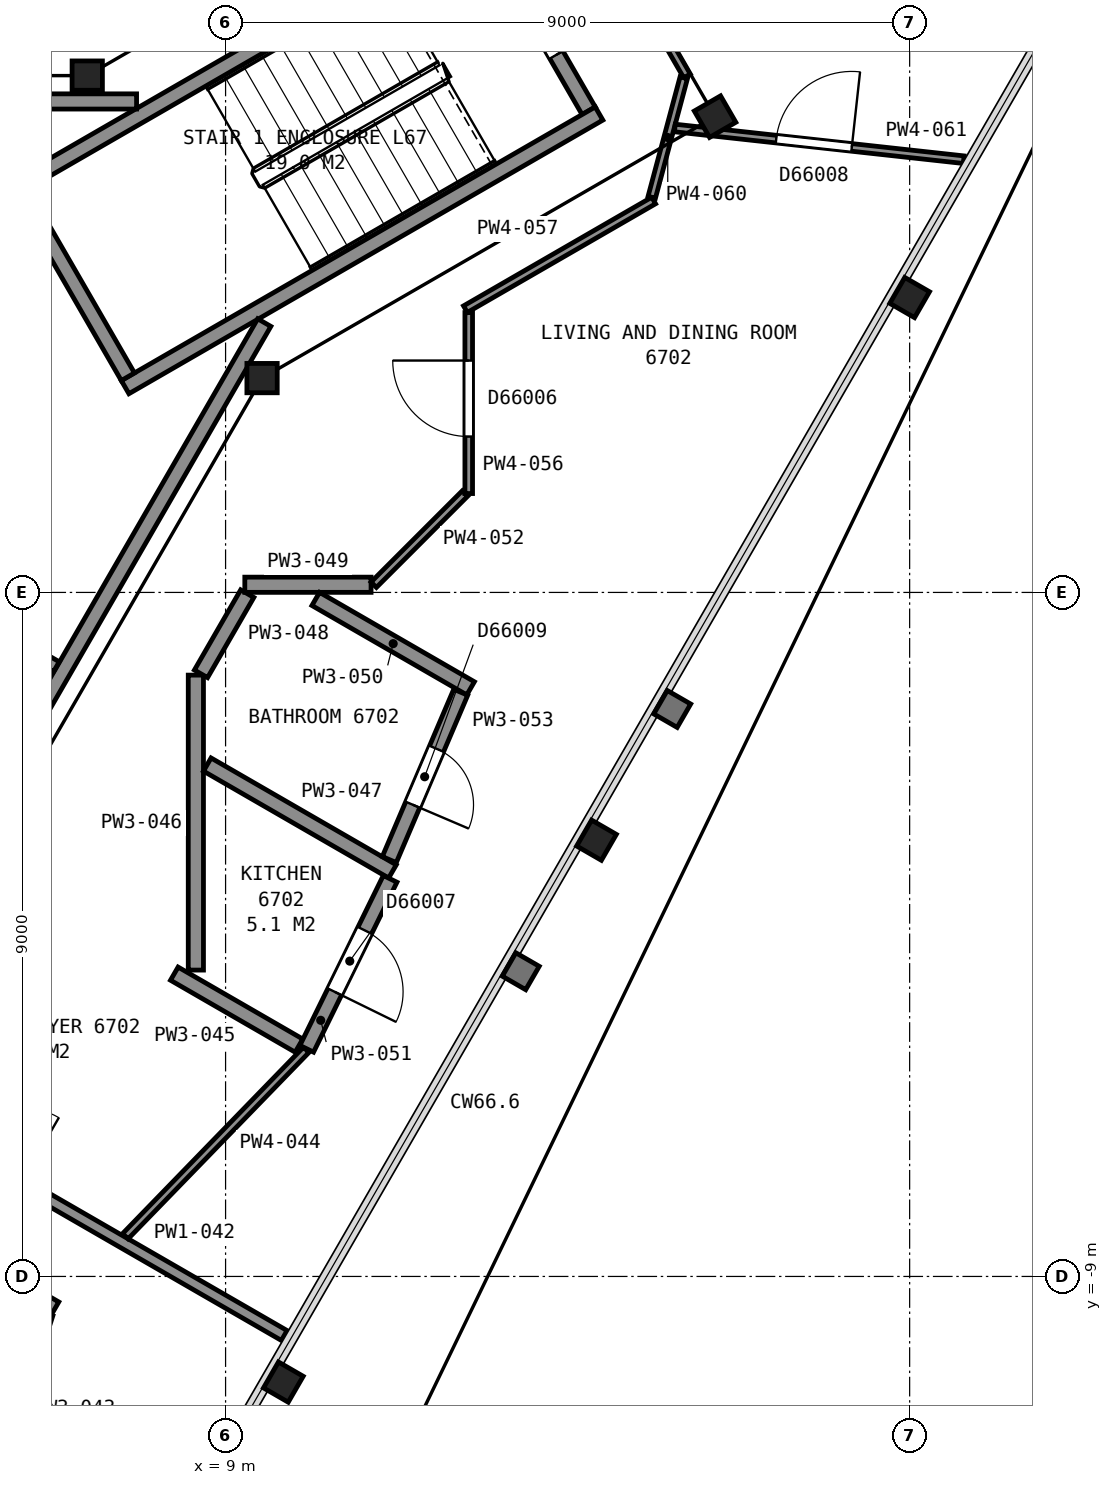
"""IFC4 building model, lengths in metres.
Left out: names, types, materials, properties, quantities, classifications, styles, units other than length and angle.
Written with IfcOpenShell. Run it as: python <this file> out.ifc"""

import sys

from ifc_helpers import new_model, si_unit, direction, frame, frame_2d, origin, origin_2d, place, context, subcontext, project, spatial, rectangle, i_section, extrude, element, fill, save


model = new_model("IFC4")
c1 = context("Model", 3, precision=1e-05, world=origin(), true_north=direction((0.0, 1.0)))
c2 = subcontext(c1, "Body", "Model", "MODEL_VIEW")
j1 = project(units=[si_unit("LENGTHUNIT", "METRE"), si_unit("PLANEANGLEUNIT", "RADIAN")], contexts=[c1])
p1 = place(None, origin())
s1 = spatial("IfcSite", under=j1, at=p1, CompositionType="ELEMENT")
p2 = place(p1, origin())
s2 = spatial("IfcBuilding", under=s1, at=p2, CompositionType="ELEMENT")
p3 = place(p2, frame((0.0, 0.0, 267.7)))
s3 = spatial("IfcBuildingStorey", under=s2, at=p3, CompositionType="ELEMENT", Elevation=267.7)
for number, where, z_axis, x_axis in (
    (1, (9.76, -10.39, 0.0), (0.0, 0.0, 1.0), (-0.5, -0.866, 0.0)),
    (2, (13.88, -3.26, 0.0), (0.0, 0.0, 1.0), (-0.5, -0.866, 0.0)),
    (3, (18.0, 3.88, 0.0), (0.0, 0.0, 1.0), (-0.5, -0.866, 0.0)),
):
    element("IfcColumn", number, at=place(p3, frame(where, z_axis=z_axis, x_axis=x_axis)), inside=s3, PredefinedType="COLUMN", context=c2, shape_type="SweptSolid", body=[
        extrude(i_section(OverallWidth=0.394, OverallDepth=0.376, WebThickness=0.017, FlangeThickness=0.028, FilletRadius=0.015, at=origin_2d()), origin(), (0.0, 0.0, 1.0), 3.7),
    ])
p4 = place(p3, frame((9.48, 2.82, 0.0), z_axis=(0.0, 0.0, 1.0), x_axis=(1.0, 0.0, 0.0)))
e4 = element("IfcColumn", 4, at=p4, inside=s3, PredefinedType="COLUMN", context=c2, shape_type="SweptSolid", body=[
    extrude(i_section(OverallWidth=0.399, OverallDepth=0.386, WebThickness=0.021, FlangeThickness=0.033, FilletRadius=0.015, at=origin_2d()), origin(), (0.0, 0.0, 1.0), 3.7),
])
p5 = place(p3, frame((15.44, 6.26, 0.0), z_axis=(0.0, 0.0, 1.0), x_axis=(0.5, -0.866025403784, 0.0)))
e5 = element("IfcColumn", 5, at=p5, inside=s3, PredefinedType="COLUMN", context=c2, shape_type="SweptSolid", body=[
    extrude(i_section(OverallWidth=0.401, OverallDepth=0.399, WebThickness=0.025, FlangeThickness=0.04, FilletRadius=0.015, at=origin_2d()), origin(), (0.0, 0.0, 1.0), 3.7),
])
p6 = place(p3, frame((7.18, 6.8, 0.0), z_axis=(0.0, 0.0, 1.0), x_axis=(1.0, 0.0, 0.0)))
e6 = element("IfcColumn", 6, at=p6, inside=s3, PredefinedType="COLUMN", context=c2, shape_type="SweptSolid", body=[
    extrude(i_section(OverallWidth=0.399, OverallDepth=0.386, WebThickness=0.021, FlangeThickness=0.033, FilletRadius=0.015, at=origin_2d()), origin(), (0.0, 0.0, 1.0), 3.7),
])
p7 = place(p3, frame((13.777, 6.338, 0.0), z_axis=(0.0, 0.0, 1.0), x_axis=(-0.500049511043, 0.865996816683, 0.0)))
e7 = element("IfcWall", 7, at=p7, inside=s3, PredefinedType="PARTITIONING", context=c2, shape_type="SweptSolid", body=[
    extrude(rectangle(XDim=2.8, YDim=0.2, at=frame_2d((1.4, 0.0))), origin(), (0.0, 0.0, 1.0), 3.45),
])
p8 = place(p7, frame((0.85, 0.0, 0.0)))
e8 = element("IfcOpeningElement", 8, at=p8, cuts=e7, PredefinedType="OPENING", context=c2, shape_type="SweptSolid", body=[
    extrude(rectangle(XDim=1.1, YDim=2.1, at=frame_2d((0.55, 1.05))), frame((0.0, 0.11, 0.0), z_axis=(0.0, -1.0, 0.0), x_axis=(1.0, 0.0, 0.0)), (0.0, 0.0, 1.0), 0.22),
])
for number, where, z_axis, x_axis in (
    (9, (6.178, 5.299, 0.0), (0.0, 0.0, 1.0), (0.866, 0.5, 0.0)),
    (10, (7.678, 2.701, 0.0), (0.0, 0.0, 1.0), (0.866, 0.5, 0.0)),
):
    element("IfcWall", number, at=place(p3, frame(where, z_axis=z_axis, x_axis=x_axis)), inside=s3, PredefinedType="PARTITIONING", context=c2, shape_type="SweptSolid", body=[
        extrude(rectangle(XDim=7.2, YDim=0.2, at=frame_2d((3.6, 0.0))), origin(), (0.0, 0.0, 1.0), 3.45),
    ])
p9 = place(p3, frame((7.715, 2.838, 0.0), z_axis=(0.0, 0.0, 1.0), x_axis=(-0.500049511043, 0.865996816683, 0.0)))
e11 = element("IfcWall", 11, at=p9, inside=s3, PredefinedType="PARTITIONING", context=c2, shape_type="SweptSolid", body=[
    extrude(rectangle(XDim=2.8, YDim=0.2, at=frame_2d((1.4, 0.0))), origin(), (0.0, 0.0, 1.0), 3.45),
])
p10 = place(p3, frame((7.829, 6.46, 0.0), z_axis=(0.0, 0.0, 1.0), x_axis=(-1.0, 0.0, 0.0)))
e12 = element("IfcWall", 12, at=p10, inside=s3, PredefinedType="PARTITIONING", context=c2, shape_type="SweptSolid", body=[
    extrude(rectangle(XDim=15.658, YDim=0.2, at=frame_2d((7.829, 0.0))), origin(), (0.0, 0.0, 1.0), 3.45),
])
p11 = place(p10, frame((12.168, 0.0, 0.0)))
e13 = element("IfcOpeningElement", 13, at=p11, cuts=e12, PredefinedType="OPENING", context=c2, shape_type="SweptSolid", body=[
    extrude(rectangle(XDim=1.2, YDim=2.1, at=frame_2d((0.6, 1.05))), frame((0.0, 0.11, 0.0), z_axis=(0.0, -1.0, 0.0), x_axis=(1.0, 0.0, 0.0)), (0.0, 0.0, 1.0), 0.22),
])
p12 = place(p3, frame((3.828, -6.29, 0.0), z_axis=(0.0, 0.0, 1.0), x_axis=(0.499979739078, 0.866037101117, 0.0)))
e14 = element("IfcWall", 14, at=p12, inside=s3, PredefinedType="PARTITIONING", context=c2, shape_type="SweptSolid", body=[
    extrude(rectangle(XDim=11.363, YDim=0.2, at=frame_2d((5.681, 0.0))), origin(), (0.0, 0.0, 1.0), 3.45),
])
p13 = place(p12, frame((0.55, 0.0, 0.0)))
e15 = element("IfcOpeningElement", 15, at=p13, cuts=e14, PredefinedType="OPENING", context=c2, shape_type="SweptSolid", body=[
    extrude(rectangle(XDim=1.2, YDim=2.1, at=frame_2d((0.6, 1.05))), frame((0.0, 0.11, 0.0), z_axis=(0.0, -1.0, 0.0), x_axis=(1.0, 0.0, 0.0)), (0.0, 0.0, 1.0), 0.22),
])
p14 = place(p3, frame((6.774, -0.978, 0.0), z_axis=(0.0, 0.0, 1.0), x_axis=(-0.866062920605, 0.499935013329, 0.0)))
e16 = element("IfcWall", 16, at=p14, inside=s3, PredefinedType="PARTITIONING", context=c2, shape_type="SweptSolid", body=[
    extrude(rectangle(XDim=2.22, YDim=0.15, at=frame_2d((1.11, 0.0))), origin(), (0.0, 0.0, 1.0), 3.45),
])
p15 = place(p14, frame((0.646, 0.0, 0.0)))
e17 = element("IfcOpeningElement", 17, at=p15, cuts=e16, PredefinedType="OPENING", context=c2, shape_type="SweptSolid", body=[
    extrude(rectangle(XDim=0.9, YDim=2.1, at=frame_2d((0.45, 1.05))), frame((0.0, 0.085, 0.0), z_axis=(0.0, -1.0, 0.0), x_axis=(1.0, 0.0, 0.0)), (0.0, 0.0, 1.0), 0.17),
])
p16 = place(p3, frame((3.498, -7.541, 0.0), z_axis=(0.0, 0.0, 1.0), x_axis=(0.865985624761, -0.500068892961, 0.0)))
e18 = element("IfcWall", 18, at=p16, inside=s3, PredefinedType="PARTITIONING", context=c2, shape_type="SweptSolid", body=[
    extrude(rectangle(XDim=3.762, YDim=0.2, at=frame_2d((1.881, 0.0))), origin(), (0.0, 0.0, 1.0), 2.723),
])
p17 = place(p3, frame((9.772, -9.777, 0.0), z_axis=(0.0, 0.0, 1.0), x_axis=(-0.866083818164, 0.499898809675, 0.0)))
e19 = element("IfcWall", 19, at=p17, inside=s3, PredefinedType="PARTITIONING", context=c2, shape_type="SweptSolid", body=[
    extrude(rectangle(XDim=6.551, YDim=0.15, at=frame_2d((3.275, 0.0))), origin(), (0.0, 0.0, 1.0), 2.723),
])
p18 = place(p17, frame((4.001, 0.0, 0.0)))
e20 = element("IfcOpeningElement", 20, at=p18, cuts=e19, PredefinedType="OPENING", context=c2, shape_type="SweptSolid", body=[
    extrude(rectangle(XDim=1.0, YDim=2.1, at=frame_2d((0.5, 1.05))), frame((0.0, 0.085, 0.0), z_axis=(0.0, -1.0, 0.0), x_axis=(1.0, 0.0, 0.0)), (0.0, 0.0, 1.0), 0.17),
])
p19 = place(p3, frame((5.824, -11.999, 0.0), z_axis=(0.0, 0.0, 1.0), x_axis=(0.306054089199, 0.95201412515, 0.0)))
e21 = element("IfcWall", 21, at=p19, inside=s3, PredefinedType="PARTITIONING", context=c2, shape_type="SweptSolid", body=[
    extrude(rectangle(XDim=2.64, YDim=0.2, at=frame_2d((1.32, 0.0))), origin(), (0.0, 0.0, 1.0), 2.723),
])
p20 = place(p3, frame((7.682, -8.47, 0.0), z_axis=(0.0, 0.0, 1.0), x_axis=(0.696344433623, 0.717707760696, 0.0)))
e22 = element("IfcWall", 22, at=p20, inside=s3, PredefinedType="PARTITIONING", context=c2, shape_type="SweptSolid", body=[
    extrude(rectangle(XDim=3.417, YDim=0.1, at=frame_2d((1.708, 0.0))), origin(), (0.0, 0.0, 1.0), 2.723),
])
p21 = place(p3, frame((8.325, -5.016, 0.0), z_axis=(0.0, 0.0, 1.0), x_axis=(0.866093293964, -0.499882392319, 0.0)))
e23 = element("IfcWall", 23, at=p21, inside=s3, PredefinedType="PARTITIONING", context=c2, shape_type="SweptSolid", body=[
    extrude(rectangle(XDim=1.894, YDim=0.2, at=frame_2d((0.947, 0.0))), origin(), (0.0, 0.0, 1.0), 2.723),
])
p22 = place(p3, frame((8.609, -4.969, 0.0), z_axis=(0.0, 0.0, 1.0), x_axis=(0.0, 1.0, 0.0)))
e24 = element("IfcWall", 24, at=p22, inside=s3, PredefinedType="PARTITIONING", context=c2, shape_type="SweptSolid", body=[
    extrude(rectangle(XDim=3.881, YDim=0.2, at=frame_2d((1.94, 0.0))), origin(), (0.0, 0.0, 1.0), 2.723),
])
p23 = place(p3, frame((8.759, -2.265, 0.0), z_axis=(0.0, 0.0, 1.0), x_axis=(0.866098885879, -0.499872703674, 0.0)))
e25 = element("IfcWall", 25, at=p23, inside=s3, PredefinedType="PARTITIONING", context=c2, shape_type="SweptSolid", body=[
    extrude(rectangle(XDim=2.813, YDim=0.2, at=frame_2d((1.407, 0.0))), origin(), (0.0, 0.0, 1.0), 2.723),
])
p24 = place(p3, frame((8.677, -1.071, 0.0), z_axis=(0.0, 0.0, 1.0), x_axis=(0.499803412959, 0.86613887362, 0.0)))
e26 = element("IfcWall", 26, at=p24, inside=s3, PredefinedType="PARTITIONING", context=c2, shape_type="SweptSolid", body=[
    extrude(rectangle(XDim=1.218, YDim=0.2, at=frame_2d((0.609, 0.0))), origin(), (0.0, 0.0, 1.0), 2.723),
])
p25 = place(p3, frame((9.253, 0.101, 0.0), z_axis=(0.0, 0.0, 1.0), x_axis=(1.0, 0.0, 0.0)))
e27 = element("IfcWall", 27, at=p25, inside=s3, PredefinedType="PARTITIONING", context=c2, shape_type="SweptSolid", body=[
    extrude(rectangle(XDim=1.661, YDim=0.2, at=frame_2d((0.831, 0.0))), origin(), (0.0, 0.0, 1.0), 2.723),
])
p26 = place(p3, frame((10.186, -0.086, 0.0), z_axis=(0.0, 0.0, 1.0), x_axis=(0.866024864377, -0.50000093428, 0.0)))
e28 = element("IfcWall", 28, at=p26, inside=s3, PredefinedType="PARTITIONING", context=c2, shape_type="SweptSolid", body=[
    extrude(rectangle(XDim=2.353, YDim=0.2, at=frame_2d((1.176, 0.0))), origin(), (0.0, 0.0, 1.0), 2.723),
])
p27 = place(p3, frame((10.068, -6.005, 0.0), z_axis=(0.0, 0.0, 1.0), x_axis=(0.440614307878, 0.897696514248, 0.0)))
e29 = element("IfcWall", 29, at=p27, inside=s3, PredefinedType="PARTITIONING", context=c2, shape_type="SweptSolid", body=[
    extrude(rectangle(XDim=2.491, YDim=0.2, at=frame_2d((1.245, 0.0))), origin(), (0.0, 0.0, 1.0), 2.723),
])
p28 = place(p27, frame((0.835, 0.0, 0.0)))
e30 = element("IfcOpeningElement", 30, at=p28, cuts=e29, PredefinedType="OPENING", context=c2, shape_type="SweptSolid", body=[
    extrude(rectangle(XDim=0.9, YDim=2.1, at=frame_2d((0.45, 1.05))), frame((0.0, 0.11, 0.0), z_axis=(0.0, -1.0, 0.0), x_axis=(1.0, 0.0, 0.0)), (0.0, 0.0, 1.0), 0.22),
])
p29 = place(p3, frame((10.949, 0.101, 0.0), z_axis=(0.0, 0.0, 1.0), x_axis=(0.707106781187, 0.707106781187, 0.0)))
e31 = element("IfcWall", 31, at=p29, inside=s3, PredefinedType="PARTITIONING", context=c2, shape_type="SweptSolid", body=[
    extrude(rectangle(XDim=1.698, YDim=0.1, at=frame_2d((0.849, 0.0))), origin(), (0.0, 0.0, 1.0), 2.723),
])
p30 = place(p3, frame((11.154, -3.515, 0.0), z_axis=(0.0, 0.0, 1.0), x_axis=(0.392515754301, 0.919745281383, 0.0)))
e32 = element("IfcWall", 32, at=p30, inside=s3, PredefinedType="PARTITIONING", context=c2, shape_type="SweptSolid", body=[
    extrude(rectangle(XDim=2.394, YDim=0.2, at=frame_2d((1.197, 0.0))), origin(), (0.0, 0.0, 1.0), 2.723),
])
p31 = place(p30, frame((0.785, 0.0, 0.0)))
e33 = element("IfcOpeningElement", 33, at=p31, cuts=e32, PredefinedType="OPENING", context=c2, shape_type="SweptSolid", body=[
    extrude(rectangle(XDim=0.8, YDim=2.1, at=frame_2d((0.4, 1.05))), frame((0.0, 0.11, 0.0), z_axis=(0.0, -1.0, 0.0), x_axis=(1.0, 0.0, 0.0)), (0.0, 0.0, 1.0), 0.22),
])
p32 = place(p3, frame((12.199, 3.682, 0.0), z_axis=(0.0, 0.0, 1.0), x_axis=(0.0, -1.0, 0.0)))
e34 = element("IfcWall", 34, at=p32, inside=s3, PredefinedType="PARTITIONING", context=c2, shape_type="SweptSolid", body=[
    extrude(rectangle(XDim=2.381, YDim=0.1, at=frame_2d((1.19, 0.0))), origin(), (0.0, 0.0, 1.0), 2.723),
])
p33 = place(p32, frame((0.631, 0.0, 0.0)))
e35 = element("IfcOpeningElement", 35, at=p33, cuts=e34, PredefinedType="OPENING", context=c2, shape_type="SweptSolid", body=[
    extrude(rectangle(XDim=1.0, YDim=2.1, at=frame_2d((0.5, 1.05))), frame((0.0, 0.06, 0.0), z_axis=(0.0, -1.0, 0.0), x_axis=(1.0, 0.0, 0.0)), (0.0, 0.0, 1.0), 0.12),
])
p34 = place(p3, frame((12.156, 3.727, 0.0), z_axis=(0.0, 0.0, 1.0), x_axis=(0.866012137121, 0.500022977831, 0.0)))
e36 = element("IfcWall", 36, at=p34, inside=s3, PredefinedType="PARTITIONING", context=c2, shape_type="SweptSolid", body=[
    extrude(rectangle(XDim=2.86, YDim=0.1, at=frame_2d((1.43, 0.0))), origin(), (0.0, 0.0, 1.0), 2.723),
])
p35 = place(p3, frame((13.771, 9.047, 0.0), z_axis=(0.0, 0.0, 1.0), x_axis=(0.500006934395, -0.866021400173, 0.0)))
e37 = element("IfcWall", 37, at=p35, inside=s3, PredefinedType="PARTITIONING", context=c2, shape_type="SweptSolid", body=[
    extrude(rectangle(XDim=2.6, YDim=0.1, at=frame_2d((1.3, 0.0))), origin(), (0.0, 0.0, 1.0), 2.723),
])
p36 = place(p3, frame((14.607, 5.2, 0.0), z_axis=(0.0, 0.0, 1.0), x_axis=(0.258531076101, 0.966002941346, 0.0)))
e38 = element("IfcWall", 38, at=p36, inside=s3, PredefinedType="PARTITIONING", context=c2, shape_type="SweptSolid", body=[
    extrude(rectangle(XDim=1.627, YDim=0.1, at=frame_2d((0.813, 0.0))), origin(), (0.0, 0.0, 1.0), 2.723),
])
p37 = place(p3, frame((14.911, 6.111, 0.0), z_axis=(0.0, 0.0, 1.0), x_axis=(0.994040808037, -0.10900858662, 0.0)))
e39 = element("IfcWall", 39, at=p37, inside=s3, PredefinedType="PARTITIONING", context=c2, shape_type="SweptSolid", body=[
    extrude(rectangle(XDim=3.823, YDim=0.1, at=frame_2d((1.912, 0.0))), origin(), (0.0, 0.0, 1.0), 2.723),
])
p38 = place(p37, frame((1.342, 0.0, 0.0)))
e40 = element("IfcOpeningElement", 40, at=p38, cuts=e39, PredefinedType="OPENING", context=c2, shape_type="SweptSolid", body=[
    extrude(rectangle(XDim=1.0, YDim=2.1, at=frame_2d((0.5, 1.05))), frame((0.0, 0.06, 0.0), z_axis=(0.0, -1.0, 0.0), x_axis=(1.0, 0.0, 0.0)), (0.0, 0.0, 1.0), 0.12),
])
p39 = place(p8, origin())
e41 = element("IfcDoor", 41, at=p39, inside=s3, OperationType="SINGLE_SWING_LEFT", PredefinedType="DOOR", context=c2, shape_type="SweptSolid", body=[
    extrude(rectangle(XDim=1.1, YDim=2.1, at=frame_2d((0.55, 1.05))), frame((0.0, 0.025, 0.0), z_axis=(0.0, -1.0, 0.0), x_axis=(1.0, 0.0, 0.0)), (0.0, 0.0, 1.0), 0.05),
])
fill(e8, e41)
p40 = place(p28, origin())
e42 = element("IfcDoor", 42, at=p40, inside=s3, OperationType="SINGLE_SWING_LEFT", PredefinedType="DOOR", context=c2, shape_type="SweptSolid", body=[
    extrude(rectangle(XDim=0.9, YDim=2.1, at=frame_2d((0.45, 1.05))), frame((0.0, 0.025, 0.0), z_axis=(0.0, -1.0, 0.0), x_axis=(1.0, 0.0, 0.0)), (0.0, 0.0, 1.0), 0.05),
])
fill(e30, e42)
p41 = place(p31, origin())
e43 = element("IfcDoor", 43, at=p41, inside=s3, OperationType="SINGLE_SWING_LEFT", PredefinedType="DOOR", context=c2, shape_type="SweptSolid", body=[
    extrude(rectangle(XDim=0.8, YDim=2.1, at=frame_2d((0.4, 1.05))), frame((0.0, 0.025, 0.0), z_axis=(0.0, -1.0, 0.0), x_axis=(1.0, 0.0, 0.0)), (0.0, 0.0, 1.0), 0.05),
])
fill(e33, e43)
p42 = place(p33, origin())
e44 = element("IfcDoor", 44, at=p42, inside=s3, OperationType="SINGLE_SWING_LEFT", PredefinedType="DOOR", context=c2, shape_type="SweptSolid", body=[
    extrude(rectangle(XDim=1.0, YDim=2.1, at=frame_2d((0.5, 1.05))), frame((0.0, 0.025, 0.0), z_axis=(0.0, -1.0, 0.0), x_axis=(1.0, 0.0, 0.0)), (0.0, 0.0, 1.0), 0.05),
])
fill(e35, e44)
p43 = place(p38, origin())
e45 = element("IfcDoor", 45, at=p43, inside=s3, OperationType="SINGLE_SWING_RIGHT", PredefinedType="DOOR", context=c2, shape_type="SweptSolid", body=[
    extrude(rectangle(XDim=1.0, YDim=2.1, at=frame_2d((0.5, 1.05))), frame((0.0, 0.025, 0.0), z_axis=(0.0, -1.0, 0.0), x_axis=(1.0, 0.0, 0.0)), (0.0, 0.0, 1.0), 0.05),
])
fill(e40, e45)
save(model, sys.argv[1])
